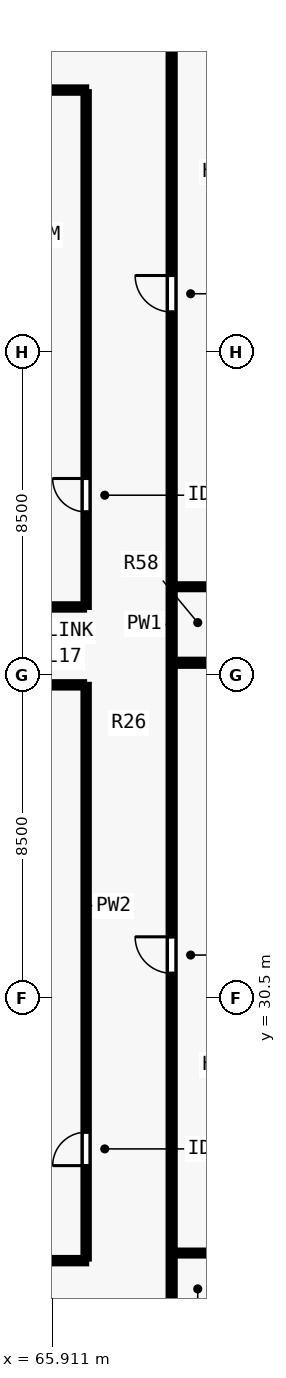
"""IFC4 building model, lengths in metres.
Left out: names, types, materials, properties, quantities, classifications, styles, units other than length and angle.
Written with IfcOpenShell. Run it as: python <this file> out.ifc"""

import sys

from ifc_helpers import new_model, si_unit, direction, frame, frame_2d, origin, place, context, subcontext, project, spatial, rectangle, extrude, element, fill, save


model = new_model("IFC4")
c1 = context("Model", 3, precision=1e-05, world=origin(), true_north=direction((0.0, 1.0)))
c2 = subcontext(c1, "Body", "Model", "MODEL_VIEW")
j1 = project(units=[si_unit("LENGTHUNIT", "METRE"), si_unit("PLANEANGLEUNIT", "RADIAN")], contexts=[c1])
p1 = place(None, origin())
s1 = spatial("IfcSite", under=j1, at=p1, CompositionType="ELEMENT")
p2 = place(p1, origin())
s2 = spatial("IfcBuilding", under=s1, at=p2, CompositionType="ELEMENT")
p3 = place(p2, frame((0.0, 0.0, 65.5)))
s3 = spatial("IfcBuildingStorey", under=s2, at=p3, CompositionType="ELEMENT", Elevation=65.5)
p4 = place(p3, frame((69.05, 21.415, 0.0), z_axis=(0.0, 0.0, 1.0), x_axis=(0.0, 1.0, 0.0)))
e1 = element("IfcWall", 1, at=p4, inside=s3, PredefinedType="PARTITIONING", context=c2, shape_type="SweptSolid", body=[
    extrude(rectangle(XDim=35.17, YDim=0.16, at=frame_2d((17.585, 0.0))), origin(), (0.0, 0.0, 1.0), 3.28),
])
p5 = place(p4, frame((9.746, 0.0, 0.0)))
e2 = element("IfcOpeningElement", 2, at=p5, cuts=e1, PredefinedType="OPENING", context=c2, shape_type="SweptSolid", body=[
    extrude(rectangle(XDim=0.96, YDim=2.15, at=frame_2d((0.48, 1.075))), frame((0.0, 0.09, 0.0), z_axis=(0.0, -1.0, 0.0), x_axis=(1.0, 0.0, 0.0)), (0.0, 0.0, 1.0), 0.18),
])
p6 = place(p4, frame((27.146, 0.0, 0.0)))
e3 = element("IfcOpeningElement", 3, at=p6, cuts=e1, PredefinedType="OPENING", context=c2, shape_type="SweptSolid", body=[
    extrude(rectangle(XDim=0.96, YDim=2.15, at=frame_2d((0.48, 1.075))), frame((0.0, 0.09, 0.0), z_axis=(0.0, -1.0, 0.0), x_axis=(1.0, 0.0, 0.0)), (0.0, 0.0, 1.0), 0.18),
])
p7 = place(p3, frame((37.2, 23.6, 0.0), z_axis=(0.0, 0.0, 1.0), x_axis=(1.0, 0.0, 0.0)))
e4 = element("IfcWall", 4, at=p7, inside=s3, PredefinedType="PARTITIONING", context=c2, shape_type="SweptSolid", body=[
    extrude(rectangle(XDim=29.6, YDim=0.14, at=frame_2d((14.8, 0.0))), origin(), (0.0, 0.0, 1.0), 3.28),
])
p8 = place(p7, frame((1.2, 0.0, 0.0)))
e5 = element("IfcOpeningElement", 5, at=p8, cuts=e4, PredefinedType="OPENING", context=c2, shape_type="SweptSolid", body=[
    extrude(rectangle(XDim=0.88, YDim=2.1, at=frame_2d((0.44, 1.05))), frame((0.0, 0.08, 0.0), z_axis=(0.0, -1.0, 0.0), x_axis=(1.0, 0.0, 0.0)), (0.0, 0.0, 1.0), 0.16),
])
p9 = place(p7, frame((11.3, 0.0, 0.0)))
e6 = element("IfcOpeningElement", 6, at=p9, cuts=e4, PredefinedType="OPENING", context=c2, shape_type="SweptSolid", body=[
    extrude(rectangle(XDim=0.88, YDim=2.1, at=frame_2d((0.44, 1.05))), frame((0.0, 0.08, 0.0), z_axis=(0.0, -1.0, 0.0), x_axis=(1.0, 0.0, 0.0)), (0.0, 0.0, 1.0), 0.16),
])
p10 = place(p7, frame((21.8, 0.0, 0.0)))
e7 = element("IfcOpeningElement", 7, at=p10, cuts=e4, PredefinedType="OPENING", context=c2, shape_type="SweptSolid", body=[
    extrude(rectangle(XDim=0.88, YDim=2.1, at=frame_2d((0.44, 1.05))), frame((0.0, 0.08, 0.0), z_axis=(0.0, -1.0, 0.0), x_axis=(1.0, 0.0, 0.0)), (0.0, 0.0, 1.0), 0.16),
])
p11 = place(p3, frame((37.2, 54.4, 0.0), z_axis=(0.0, 0.0, 1.0), x_axis=(1.0, 0.0, 0.0)))
e8 = element("IfcWall", 8, at=p11, inside=s3, PredefinedType="PARTITIONING", context=c2, shape_type="SweptSolid", body=[
    extrude(rectangle(XDim=29.6, YDim=0.14, at=frame_2d((14.8, 0.0))), origin(), (0.0, 0.0, 1.0), 3.28),
])
p12 = place(p11, frame((2.2, 0.0, 0.0)))
e9 = element("IfcOpeningElement", 9, at=p12, cuts=e8, PredefinedType="OPENING", context=c2, shape_type="SweptSolid", body=[
    extrude(rectangle(XDim=0.88, YDim=2.1, at=frame_2d((0.44, 1.05))), frame((0.0, 0.08, 0.0), z_axis=(0.0, -1.0, 0.0), x_axis=(1.0, 0.0, 0.0)), (0.0, 0.0, 1.0), 0.16),
])
p13 = place(p11, frame((15.3, 0.0, 0.0)))
e10 = element("IfcOpeningElement", 10, at=p13, cuts=e8, PredefinedType="OPENING", context=c2, shape_type="SweptSolid", body=[
    extrude(rectangle(XDim=0.88, YDim=2.1, at=frame_2d((0.44, 1.05))), frame((0.0, 0.08, 0.0), z_axis=(0.0, -1.0, 0.0), x_axis=(1.0, 0.0, 0.0)), (0.0, 0.0, 1.0), 0.16),
])
p14 = place(p11, frame((24.8, 0.0, 0.0)))
e11 = element("IfcOpeningElement", 11, at=p14, cuts=e8, PredefinedType="OPENING", context=c2, shape_type="SweptSolid", body=[
    extrude(rectangle(XDim=0.88, YDim=2.1, at=frame_2d((0.44, 1.05))), frame((0.0, 0.08, 0.0), z_axis=(0.0, -1.0, 0.0), x_axis=(1.0, 0.0, 0.0)), (0.0, 0.0, 1.0), 0.16),
])
p15 = place(p3, frame((66.8, 23.655, 0.0), z_axis=(0.0, 0.0, 1.0), x_axis=(0.0, 1.0, 0.0)))
e12 = element("IfcWall", 12, at=p15, inside=s3, PredefinedType="PARTITIONING", context=c2, shape_type="SweptSolid", body=[
    extrude(rectangle(XDim=15.095, YDim=0.14, at=frame_2d((7.547, 0.0))), origin(), (0.0, 0.0, 1.0), 3.28),
])
p16 = place(p15, frame((2.445, 0.0, 0.0)))
e13 = element("IfcOpeningElement", 13, at=p16, cuts=e12, PredefinedType="OPENING", context=c2, shape_type="SweptSolid", body=[
    extrude(rectangle(XDim=0.88, YDim=2.1, at=frame_2d((0.44, 1.05))), frame((0.0, 0.08, 0.0), z_axis=(0.0, -1.0, 0.0), x_axis=(1.0, 0.0, 0.0)), (0.0, 0.0, 1.0), 0.16),
])
p17 = place(p3, frame((66.8, 40.8, 0.0), z_axis=(0.0, 0.0, 1.0), x_axis=(0.0, 1.0, 0.0)))
e14 = element("IfcWall", 14, at=p17, inside=s3, PredefinedType="PARTITIONING", context=c2, shape_type="SweptSolid", body=[
    extrude(rectangle(XDim=13.545, YDim=0.14, at=frame_2d((6.772, 0.0))), origin(), (0.0, 0.0, 1.0), 3.28),
])
p18 = place(p17, frame((2.5, 0.0, 0.0)))
e15 = element("IfcOpeningElement", 15, at=p18, cuts=e14, PredefinedType="OPENING", context=c2, shape_type="SweptSolid", body=[
    extrude(rectangle(XDim=0.88, YDim=2.1, at=frame_2d((0.44, 1.05))), frame((0.0, 0.08, 0.0), z_axis=(0.0, -1.0, 0.0), x_axis=(1.0, 0.0, 0.0)), (0.0, 0.0, 1.0), 0.16),
])
for number, where, z_axis, x_axis in (
    (16, (60.76, 38.75, 0.0), (0.0, 0.0, 1.0), (1.0, 0.0, 0.0)),
    (17, (60.76, 40.8, 0.0), (0.0, 0.0, 1.0), (1.0, 0.0, 0.0)),
):
    element("IfcWall", number, at=place(p3, frame(where, z_axis=z_axis, x_axis=x_axis)), inside=s3, PredefinedType="PARTITIONING", context=c2, shape_type="SweptSolid", body=[
        extrude(rectangle(XDim=5.985, YDim=0.14, at=frame_2d((2.993, 0.0))), origin(), (0.0, 0.0, 1.0), 3.28),
    ])
p19 = place(p3, frame((69.115, 23.8, 0.0), z_axis=(0.0, 0.0, 1.0), x_axis=(1.0, 0.0, 0.0)))
e18 = element("IfcWall", 18, at=p19, inside=s3, PredefinedType="PLUMBINGWALL", context=c2, shape_type="SweptSolid", body=[
    extrude(rectangle(XDim=2.235, YDim=0.13, at=frame_2d((1.118, 0.0))), origin(), (0.0, 0.0, 1.0), 3.28),
])
p20 = place(p3, frame((69.115, 39.332, 0.0), z_axis=(0.0, 0.0, 1.0), x_axis=(1.0, 0.0, 0.0)))
e19 = element("IfcWall", 19, at=p20, inside=s3, PredefinedType="PARTITIONING", context=c2, shape_type="SweptSolid", body=[
    extrude(rectangle(XDim=8.115, YDim=0.16, at=frame_2d((4.058, 0.0))), origin(), (0.0, 0.0, 1.0), 3.28),
])
p21 = place(p3, frame((69.115, 41.332, 0.0), z_axis=(0.0, 0.0, 1.0), x_axis=(1.0, 0.0, 0.0)))
e20 = element("IfcWall", 20, at=p21, inside=s3, PredefinedType="PLUMBINGWALL", context=c2, shape_type="SweptSolid", body=[
    extrude(rectangle(XDim=2.235, YDim=0.13, at=frame_2d((1.118, 0.0))), origin(), (0.0, 0.0, 1.0), 3.28),
])
p22 = place(p16, origin())
e21 = element("IfcDoor", 21, at=p22, inside=s3, OperationType="SINGLE_SWING_LEFT", PredefinedType="DOOR", context=c2, shape_type="SweptSolid", body=[
    extrude(rectangle(XDim=0.88, YDim=2.1, at=frame_2d((0.44, 1.05))), frame((0.0, 0.025, 0.0), z_axis=(0.0, -1.0, 0.0), x_axis=(1.0, 0.0, 0.0)), (0.0, 0.0, 1.0), 0.05),
])
fill(e13, e21)
p23 = place(p18, origin())
e22 = element("IfcDoor", 22, at=p23, inside=s3, OperationType="SINGLE_SWING_RIGHT", PredefinedType="DOOR", context=c2, shape_type="SweptSolid", body=[
    extrude(rectangle(XDim=0.88, YDim=2.1, at=frame_2d((0.44, 1.05))), frame((0.0, 0.025, 0.0), z_axis=(0.0, -1.0, 0.0), x_axis=(1.0, 0.0, 0.0)), (0.0, 0.0, 1.0), 0.05),
])
fill(e15, e22)
p24 = place(p5, origin())
e23 = element("IfcDoor", 23, at=p24, inside=s3, OperationType="SINGLE_SWING_RIGHT", PredefinedType="DOOR", context=c2, shape_type="SweptSolid", body=[
    extrude(rectangle(XDim=0.96, YDim=2.15, at=frame_2d((0.48, 1.075))), frame((0.0, 0.025, 0.0), z_axis=(0.0, -1.0, 0.0), x_axis=(1.0, 0.0, 0.0)), (0.0, 0.0, 1.0), 0.05),
])
fill(e2, e23)
p25 = place(p6, origin())
e24 = element("IfcDoor", 24, at=p25, inside=s3, OperationType="SINGLE_SWING_RIGHT", PredefinedType="DOOR", context=c2, shape_type="SweptSolid", body=[
    extrude(rectangle(XDim=0.96, YDim=2.15, at=frame_2d((0.48, 1.075))), frame((0.0, 0.025, 0.0), z_axis=(0.0, -1.0, 0.0), x_axis=(1.0, 0.0, 0.0)), (0.0, 0.0, 1.0), 0.05),
])
fill(e3, e24)
save(model, sys.argv[1])
